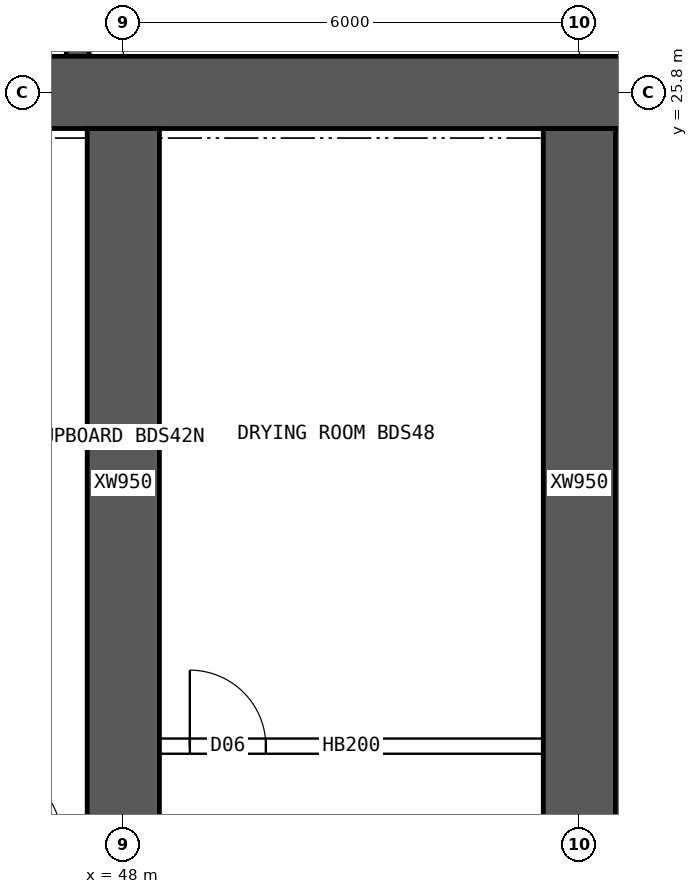
"""IFC4 building model, lengths in metres.
Left out: names, types, materials, properties, quantities, classifications, styles, units other than length and angle.
Written with IfcOpenShell. Run it as: python <this file> out.ifc"""

import sys

from ifc_helpers import new_model, si_unit, direction, frame, frame_2d, origin, place, context, subcontext, project, spatial, rectangle, extrude, element, fill, save


model = new_model("IFC4")
c1 = context("Model", 3, precision=1e-05, world=origin(), true_north=direction((0.0, 1.0)))
c2 = subcontext(c1, "Body", "Model", "MODEL_VIEW")
j1 = project(units=[si_unit("LENGTHUNIT", "METRE"), si_unit("PLANEANGLEUNIT", "RADIAN")], contexts=[c1])
p1 = place(None, origin())
s1 = spatial("IfcSite", under=j1, at=p1, CompositionType="ELEMENT")
p2 = place(p1, origin())
s2 = spatial("IfcBuilding", under=s1, at=p2, CompositionType="ELEMENT")
p3 = place(p2, frame((0.0, 0.0, 125.65)))
s3 = spatial("IfcBuildingStorey", under=s2, at=p3, CompositionType="ELEMENT", Elevation=125.65)
p4 = place(p3, frame((18.0, 25.8, 0.0), z_axis=(0.0, 0.0, 1.0), x_axis=(1.0, 0.0, 0.0)))
e1 = element("IfcWall", 1, at=p4, inside=s3, PredefinedType="SHEAR", context=c2, shape_type="SweptSolid", body=[
    extrude(rectangle(XDim=48.0, YDim=0.95, at=frame_2d((24.0, 0.0))), origin(), (0.0, 0.0, 1.0), 3.75),
])
p5 = place(p3, frame((47.4, 26.275, 0.0), z_axis=(0.0, 0.0, 1.0), x_axis=(0.0, 1.0, 0.0)))
e2 = element("IfcWall", 2, at=p5, inside=s3, PredefinedType="SHEAR", context=c2, shape_type="SweptSolid", body=[
    extrude(rectangle(XDim=3.975, YDim=0.3, at=frame_2d((1.988, 0.0))), origin(), (0.0, 0.0, 1.0), 3.75),
])
for number, where, z_axis, x_axis in (
    (3, (48.0, 16.0, 0.0), (0.0, 0.0, 1.0), (0.0, 1.0, 0.0)),
    (4, (54.0, 16.0, 0.0), (0.0, 0.0, 1.0), (0.0, 1.0, 0.0)),
):
    element("IfcWall", number, at=place(p3, frame(where, z_axis=z_axis, x_axis=x_axis)), inside=s3, PredefinedType="SHEAR", context=c2, shape_type="SweptSolid", body=[
        extrude(rectangle(XDim=9.325, YDim=0.95, at=frame_2d((4.663, 0.0))), origin(), (0.0, 0.0, 1.0), 3.75),
    ])
p6 = place(p3, frame((48.475, 17.2, 0.0), z_axis=(0.0, 0.0, 1.0), x_axis=(1.0, 0.0, 0.0)))
e5 = element("IfcWall", 5, at=p6, inside=s3, PredefinedType="SOLIDWALL", context=c2, shape_type="SweptSolid", body=[
    extrude(rectangle(XDim=5.05, YDim=0.2, at=frame_2d((2.525, 0.0))), origin(), (0.0, 0.0, 1.0), 3.5),
])
p7 = place(p6, frame((0.4, 0.0, 0.0)))
e6 = element("IfcOpeningElement", 6, at=p7, cuts=e5, PredefinedType="OPENING", context=c2, shape_type="SweptSolid", body=[
    extrude(rectangle(XDim=1.0, YDim=2.1, at=frame_2d((0.5, 1.05))), frame((0.0, 0.11, 0.0), z_axis=(0.0, -1.0, 0.0), x_axis=(1.0, 0.0, 0.0)), (0.0, 0.0, 1.0), 0.22),
])
p8 = place(p7, origin())
e7 = element("IfcDoor", 7, at=p8, inside=s3, OperationType="SINGLE_SWING_LEFT", PredefinedType="DOOR", context=c2, shape_type="SweptSolid", body=[
    extrude(rectangle(XDim=1.0, YDim=2.1, at=frame_2d((0.5, 1.05))), frame((0.0, 0.025, 0.0), z_axis=(0.0, -1.0, 0.0), x_axis=(1.0, 0.0, 0.0)), (0.0, 0.0, 1.0), 0.05),
])
fill(e6, e7)
save(model, sys.argv[1])
